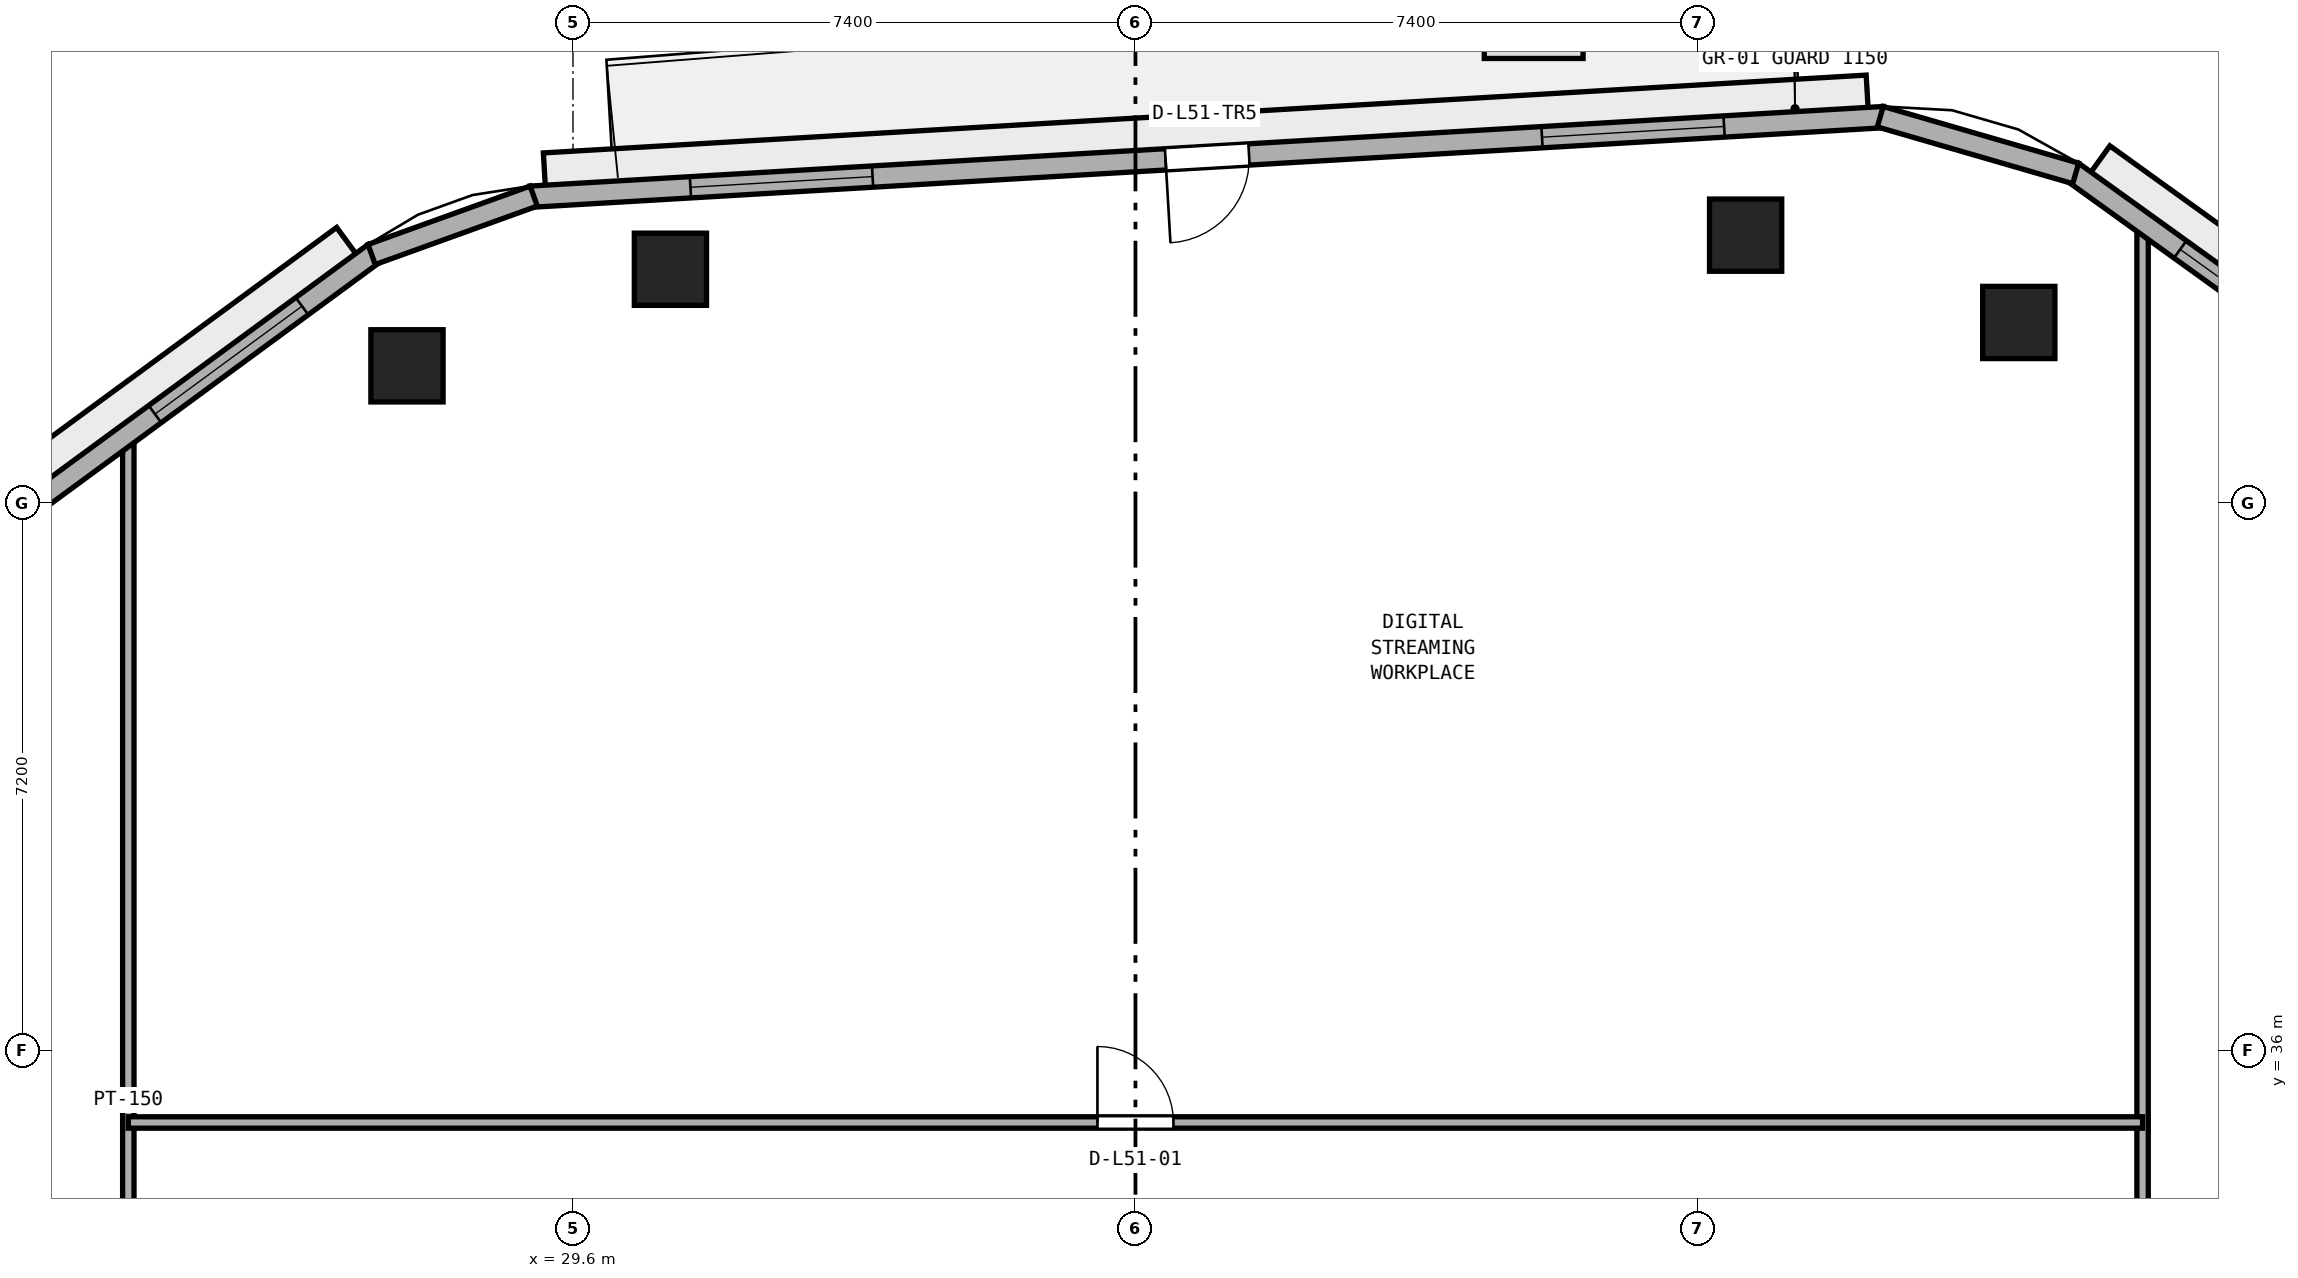
"""IFC4 building model, lengths in metres.
Left out: names, types, materials, properties, quantities, classifications, styles, units other than length and angle.
Written with IfcOpenShell. Run it as: python <this file> out.ifc"""

import sys

from ifc_helpers import new_model, si_unit, direction, frame, frame_2d, origin, origin_2d, place, context, subcontext, project, spatial, rectangle, extrude, element, fill, save


model = new_model("IFC4")
c1 = context("Model", 3, precision=1e-05, world=origin(), true_north=direction((0.0, 1.0)))
c2 = subcontext(c1, "Body", "Model", "MODEL_VIEW")
j1 = project(units=[si_unit("LENGTHUNIT", "METRE"), si_unit("PLANEANGLEUNIT", "RADIAN")], contexts=[c1])
p1 = place(None, origin())
s1 = spatial("IfcSite", under=j1, at=p1, CompositionType="ELEMENT")
p2 = place(p1, origin())
s2 = spatial("IfcBuilding", under=s1, at=p2, CompositionType="ELEMENT")
p3 = place(p2, frame((0.0, 0.0, 201.0)))
s3 = spatial("IfcBuildingStorey", under=s2, at=p3, CompositionType="ELEMENT", Elevation=201.0)
for number, where, z_axis, x_axis in (
    (1, (48.622, 45.575, 0.0), (0.0, 0.0, 1.0), (1.0, 0.0, 0.0)),
    (2, (45.028, 46.724, 0.0), (0.0, 0.0, 1.0), (1.0, 0.0, 0.0)),
    (3, (30.882, 46.275, 0.0), (0.0, 0.0, 1.0), (1.0, 0.0, 0.0)),
    (4, (27.416, 45.004, 0.0), (0.0, 0.0, 1.0), (1.0, 0.0, 0.0)),
):
    element("IfcColumn", number, at=place(p3, frame(where, z_axis=z_axis, x_axis=x_axis)), inside=s3, PredefinedType="COLUMN", context=c2, shape_type="SweptSolid", body=[
        extrude(rectangle(XDim=0.95, YDim=0.95, at=origin_2d()), origin(), (0.0, 0.0, 1.0), 3.8),
    ])
p4 = place(p3, frame((50.25, 26.55, 0.0), z_axis=(0.0, 0.0, 1.0), x_axis=(0.0, 1.0, 0.0)))
e5 = element("IfcWall", 5, at=p4, inside=s3, PredefinedType="PARTITIONING", context=c2, shape_type="SweptSolid", body=[
    extrude(rectangle(XDim=20.375, YDim=0.15, at=frame_2d((10.188, 0.0))), origin(), (0.0, 0.0, 1.0), 3.54),
])
p5 = place(p4, frame((5.725, 0.0, 0.0)))
e6 = element("IfcOpeningElement", 6, at=p5, cuts=e5, PredefinedType="OPENING", context=c2, shape_type="SweptSolid", body=[
    extrude(rectangle(XDim=0.9, YDim=2.1, at=frame_2d((0.45, 1.05))), frame((0.0, 0.085, 0.0), z_axis=(0.0, -1.0, 0.0), x_axis=(1.0, 0.0, 0.0)), (0.0, 0.0, 1.0), 0.17),
])
p6 = place(p3, frame((23.75, 26.55, 0.0), z_axis=(0.0, 0.0, 1.0), x_axis=(0.0, 1.0, 0.0)))
e7 = element("IfcWall", 7, at=p6, inside=s3, PredefinedType="PARTITIONING", context=c2, shape_type="SweptSolid", body=[
    extrude(rectangle(XDim=17.596, YDim=0.15, at=frame_2d((8.798, 0.0))), origin(), (0.0, 0.0, 1.0), 3.54),
])
p7 = place(p3, frame((23.75, 35.05, 0.0), z_axis=(0.0, 0.0, 1.0), x_axis=(1.0, 0.0, 0.0)))
e8 = element("IfcWall", 8, at=p7, inside=s3, PredefinedType="PARTITIONING", context=c2, shape_type="SweptSolid", body=[
    extrude(rectangle(XDim=26.5, YDim=0.15, at=frame_2d((13.25, 0.0))), origin(), (0.0, 0.0, 1.0), 3.54),
])
p8 = place(p7, frame((12.75, 0.0, 0.0)))
e9 = element("IfcOpeningElement", 9, at=p8, cuts=e8, PredefinedType="OPENING", context=c2, shape_type="SweptSolid", body=[
    extrude(rectangle(XDim=1.0, YDim=2.12, at=frame_2d((0.5, 1.06))), frame((0.0, 0.085, 0.0), z_axis=(0.0, -1.0, 0.0), x_axis=(1.0, 0.0, 0.0)), (0.0, 0.0, 1.0), 0.17),
])
p9 = place(p3, frame((62.054, 38.399, 0.0), z_axis=(0.0, 0.0, 1.0), x_axis=(-0.81172124793, 0.584045045915, 0.0)))
e10 = element("IfcWall", 10, at=p9, inside=s3, PredefinedType="STANDARD", context=c2, shape_type="SweptSolid", body=[
    extrude(rectangle(XDim=15.679, YDim=0.28, at=frame_2d((7.84, 0.0))), origin(), (0.0, 0.0, 1.0), 3.54),
])
p10 = place(p9, frame((1.747, 0.0, 0.9)))
e11 = element("IfcOpeningElement", 11, at=p10, cuts=e10, PredefinedType="OPENING", context=c2, shape_type="SweptSolid", body=[
    extrude(rectangle(XDim=2.4, YDim=1.75, at=frame_2d((1.2, 0.875))), frame((0.0, 0.15, 0.0), z_axis=(0.0, -1.0, 0.0), x_axis=(1.0, 0.0, 0.0)), (0.0, 0.0, 1.0), 0.3),
])
p11 = place(p9, frame((6.64, 0.0, 0.9)))
e12 = element("IfcOpeningElement", 12, at=p11, cuts=e10, PredefinedType="OPENING", context=c2, shape_type="SweptSolid", body=[
    extrude(rectangle(XDim=2.4, YDim=1.75, at=frame_2d((1.2, 0.875))), frame((0.0, 0.15, 0.0), z_axis=(0.0, -1.0, 0.0), x_axis=(1.0, 0.0, 0.0)), (0.0, 0.0, 1.0), 0.3),
])
p12 = place(p9, frame((11.533, 0.0, 0.9)))
e13 = element("IfcOpeningElement", 13, at=p12, cuts=e10, PredefinedType="OPENING", context=c2, shape_type="SweptSolid", body=[
    extrude(rectangle(XDim=2.4, YDim=1.75, at=frame_2d((1.2, 0.875))), frame((0.0, 0.15, 0.0), z_axis=(0.0, -1.0, 0.0), x_axis=(1.0, 0.0, 0.0)), (0.0, 0.0, 1.0), 0.3),
])
p13 = place(p3, frame((46.846, 48.277, 0.0), z_axis=(0.0, 0.0, 1.0), x_axis=(-0.998273806631, -0.05873165241, 0.0)))
e14 = element("IfcWall", 14, at=p13, inside=s3, PredefinedType="STANDARD", context=c2, shape_type="SweptSolid", body=[
    extrude(rectangle(XDim=17.833, YDim=0.28, at=frame_2d((8.917, 0.0))), origin(), (0.0, 0.0, 1.0), 3.54),
])
p14 = place(p13, frame((8.366, 0.0, 0.0)))
e15 = element("IfcOpeningElement", 15, at=p14, cuts=e14, PredefinedType="OPENING", context=c2, shape_type="SweptSolid", body=[
    extrude(rectangle(XDim=1.1, YDim=2.2, at=frame_2d((0.55, 1.1))), frame((0.0, 0.15, 0.0), z_axis=(0.0, -1.0, 0.0), x_axis=(1.0, 0.0, 0.0)), (0.0, 0.0, 1.0), 0.3),
])
p15 = place(p13, frame((2.105, 0.0, 0.9)))
e16 = element("IfcOpeningElement", 16, at=p15, cuts=e14, PredefinedType="OPENING", context=c2, shape_type="SweptSolid", body=[
    extrude(rectangle(XDim=2.4, YDim=1.75, at=frame_2d((1.2, 0.875))), frame((0.0, 0.15, 0.0), z_axis=(0.0, -1.0, 0.0), x_axis=(1.0, 0.0, 0.0)), (0.0, 0.0, 1.0), 0.3),
])
p16 = place(p13, frame((13.328, 0.0, 0.9)))
e17 = element("IfcOpeningElement", 17, at=p16, cuts=e14, PredefinedType="OPENING", context=c2, shape_type="SweptSolid", body=[
    extrude(rectangle(XDim=2.4, YDim=1.75, at=frame_2d((1.2, 0.875))), frame((0.0, 0.15, 0.0), z_axis=(0.0, -1.0, 0.0), x_axis=(1.0, 0.0, 0.0)), (0.0, 0.0, 1.0), 0.3),
])
p17 = place(p3, frame((26.986, 46.488, 0.0), z_axis=(0.0, 0.0, 1.0), x_axis=(-0.806097783211, -0.59178236194, 0.0)))
e18 = element("IfcWall", 18, at=p17, inside=s3, PredefinedType="STANDARD", context=c2, shape_type="SweptSolid", body=[
    extrude(rectangle(XDim=16.959, YDim=0.28, at=frame_2d((8.479, 0.0))), origin(), (0.0, 0.0, 1.0), 3.54),
])
p18 = place(p17, frame((1.18, 0.0, 0.9)))
e19 = element("IfcOpeningElement", 19, at=p18, cuts=e18, PredefinedType="OPENING", context=c2, shape_type="SweptSolid", body=[
    extrude(rectangle(XDim=2.4, YDim=1.75, at=frame_2d((1.2, 0.875))), frame((0.0, 0.15, 0.0), z_axis=(0.0, -1.0, 0.0), x_axis=(1.0, 0.0, 0.0)), (0.0, 0.0, 1.0), 0.3),
])
p19 = place(p17, frame((7.279, 0.0, 0.9)))
e20 = element("IfcOpeningElement", 20, at=p19, cuts=e18, PredefinedType="OPENING", context=c2, shape_type="SweptSolid", body=[
    extrude(rectangle(XDim=2.4, YDim=1.75, at=frame_2d((1.2, 0.875))), frame((0.0, 0.15, 0.0), z_axis=(0.0, -1.0, 0.0), x_axis=(1.0, 0.0, 0.0)), (0.0, 0.0, 1.0), 0.3),
])
p20 = place(p17, frame((12.599, 0.0, 0.9)))
e21 = element("IfcOpeningElement", 21, at=p20, cuts=e18, PredefinedType="OPENING", context=c2, shape_type="SweptSolid", body=[
    extrude(rectangle(XDim=2.4, YDim=1.75, at=frame_2d((1.2, 0.875))), frame((0.0, 0.15, 0.0), z_axis=(0.0, -1.0, 0.0), x_axis=(1.0, 0.0, 0.0)), (0.0, 0.0, 1.0), 0.3),
])
p21 = place(p3, frame((49.37, 47.536, 0.0), z_axis=(0.0, 0.0, 1.0), x_axis=(-0.960380089791, 0.278693529048, 0.0)))
e22 = element("IfcWall", 22, at=p21, inside=s3, PredefinedType="STANDARD", context=c2, shape_type="SweptSolid", body=[
    extrude(rectangle(XDim=2.677, YDim=0.28, at=frame_2d((1.338, 0.0))), origin(), (0.0, 0.0, 1.0), 3.54),
])
p22 = place(p3, frame((29.083, 47.238, 0.0), z_axis=(0.0, 0.0, 1.0), x_axis=(-0.940723909279, -0.33917329864, 0.0)))
e23 = element("IfcWall", 23, at=p22, inside=s3, PredefinedType="STANDARD", context=c2, shape_type="SweptSolid", body=[
    extrude(rectangle(XDim=2.267, YDim=0.28, at=frame_2d((1.133, 0.0))), origin(), (0.0, 0.0, 1.0), 3.54),
])
p23 = place(p8, origin())
e24 = element("IfcDoor", 24, at=p23, inside=s3, OperationType="SINGLE_SWING_LEFT", PredefinedType="DOOR", context=c2, shape_type="SweptSolid", body=[
    extrude(rectangle(XDim=1.0, YDim=2.12, at=frame_2d((0.5, 1.06))), frame((0.0, 0.025, 0.0), z_axis=(0.0, -1.0, 0.0), x_axis=(1.0, 0.0, 0.0)), (0.0, 0.0, 1.0), 0.05),
])
fill(e9, e24)
p24 = place(p12, origin())
e25 = element("IfcWindow", 25, at=p24, inside=s3, PartitioningType="SINGLE_PANEL", PredefinedType="WINDOW", context=c2, shape_type="SweptSolid", body=[
    extrude(rectangle(XDim=2.4, YDim=1.75, at=frame_2d((1.2, 0.875))), frame((0.0, 0.03, 0.0), z_axis=(0.0, -1.0, 0.0), x_axis=(1.0, 0.0, 0.0)), (0.0, 0.0, 1.0), 0.06),
])
fill(e13, e25)
p25 = place(p14, origin())
e26 = element("IfcDoor", 26, at=p25, inside=s3, OperationType="SINGLE_SWING_RIGHT", PredefinedType="DOOR", context=c2, shape_type="SweptSolid", body=[
    extrude(rectangle(XDim=1.1, YDim=2.2, at=frame_2d((0.55, 1.1))), frame((0.0, 0.025, 0.0), z_axis=(0.0, -1.0, 0.0), x_axis=(1.0, 0.0, 0.0)), (0.0, 0.0, 1.0), 0.05),
])
fill(e15, e26)
p26 = place(p15, origin())
e27 = element("IfcWindow", 27, at=p26, inside=s3, PartitioningType="SINGLE_PANEL", PredefinedType="WINDOW", context=c2, shape_type="SweptSolid", body=[
    extrude(rectangle(XDim=2.4, YDim=1.75, at=frame_2d((1.2, 0.875))), frame((0.0, 0.03, 0.0), z_axis=(0.0, -1.0, 0.0), x_axis=(1.0, 0.0, 0.0)), (0.0, 0.0, 1.0), 0.06),
])
fill(e16, e27)
p27 = place(p16, origin())
e28 = element("IfcWindow", 28, at=p27, inside=s3, PartitioningType="SINGLE_PANEL", PredefinedType="WINDOW", context=c2, shape_type="SweptSolid", body=[
    extrude(rectangle(XDim=2.4, YDim=1.75, at=frame_2d((1.2, 0.875))), frame((0.0, 0.03, 0.0), z_axis=(0.0, -1.0, 0.0), x_axis=(1.0, 0.0, 0.0)), (0.0, 0.0, 1.0), 0.06),
])
fill(e17, e28)
p28 = place(p18, origin())
e29 = element("IfcWindow", 29, at=p28, inside=s3, PartitioningType="SINGLE_PANEL", PredefinedType="WINDOW", context=c2, shape_type="SweptSolid", body=[
    extrude(rectangle(XDim=2.4, YDim=1.75, at=frame_2d((1.2, 0.875))), frame((0.0, 0.03, 0.0), z_axis=(0.0, -1.0, 0.0), x_axis=(1.0, 0.0, 0.0)), (0.0, 0.0, 1.0), 0.06),
])
fill(e19, e29)
save(model, sys.argv[1])
